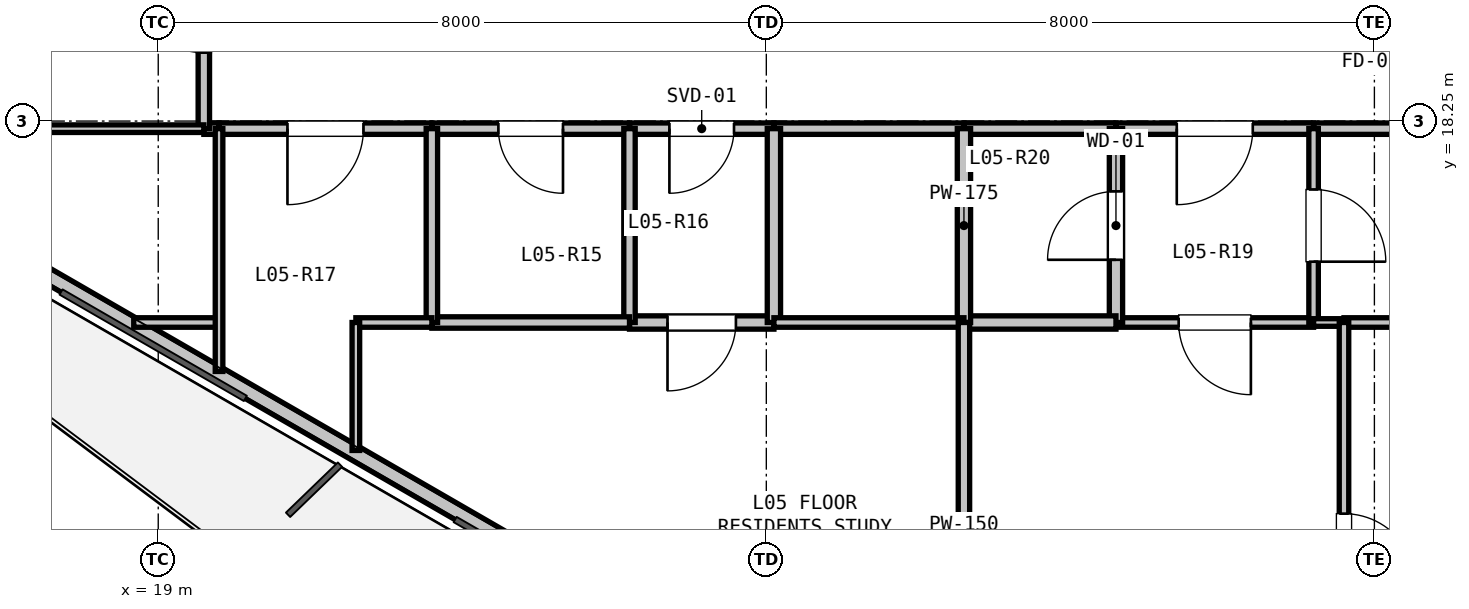
"""IFC4 building model, lengths in metres.
Left out: names, types, materials, properties, quantities, classifications, styles, units other than length and angle.
Written with IfcOpenShell. Run it as: python <this file> out.ifc"""

import sys

from ifc_helpers import new_model, si_unit, direction, frame, frame_2d, origin, place, context, subcontext, project, spatial, rectangle, extrude, element, fill, save


model = new_model("IFC4")
c1 = context("Model", 3, precision=1e-05, world=origin(), true_north=direction((0.0, 1.0)))
c2 = subcontext(c1, "Body", "Model", "MODEL_VIEW")
j1 = project(units=[si_unit("LENGTHUNIT", "METRE"), si_unit("PLANEANGLEUNIT", "RADIAN")], contexts=[c1])
p1 = place(None, origin())
s1 = spatial("IfcSite", under=j1, at=p1, CompositionType="ELEMENT")
p2 = place(p1, origin())
s2 = spatial("IfcBuilding", under=s1, at=p2, CompositionType="ELEMENT")
p3 = place(p2, frame((0.0, 0.0, 22.5)))
s3 = spatial("IfcBuildingStorey", under=s2, at=p3, CompositionType="ELEMENT", Elevation=22.5)
p4 = place(p3, frame((26.76, 10.896, 0.0), z_axis=(0.0, 0.0, 1.0), x_axis=(-0.866027351828, 0.499996625875, 0.0)))
e1 = element("IfcWall", 1, at=p4, inside=s3, PredefinedType="PARAPET", context=c2, shape_type="SweptSolid", body=[
    extrude(rectangle(XDim=11.973, YDim=0.2, at=frame_2d((5.987, 0.0))), origin(), (0.0, 0.0, 1.0), 0.2),
])
p5 = place(p3, frame((35.8, 18.15, 0.0), z_axis=(0.0, 0.0, 1.0), x_axis=(-1.0, 0.0, 0.0)))
e2 = element("IfcWall", 2, at=p5, inside=s3, PredefinedType="PARTITIONING", context=c2, shape_type="SweptSolid", body=[
    extrude(rectangle(XDim=1.6, YDim=0.15, at=frame_2d((0.8, 0.0))), origin(), (0.0, 0.0, 1.0), 3.04),
])
p6 = place(p3, frame((34.2, 18.15, 0.0), z_axis=(0.0, 0.0, 1.0), x_axis=(-1.0, 0.0, 0.0)))
e3 = element("IfcWall", 3, at=p6, inside=s3, PredefinedType="PARTITIONING", context=c2, shape_type="SweptSolid", body=[
    extrude(rectangle(XDim=2.6, YDim=0.15, at=frame_2d((1.3, 0.0))), origin(), (0.0, 0.0, 1.0), 3.04),
])
p7 = place(p6, frame((0.8, 0.0, 0.0)))
e4 = element("IfcOpeningElement", 4, at=p7, cuts=e3, PredefinedType="OPENING", context=c2, shape_type="SweptSolid", body=[
    extrude(rectangle(XDim=1.0, YDim=2.15, at=frame_2d((0.5, 1.075))), frame((0.0, 0.085, 0.0), z_axis=(0.0, -1.0, 0.0), x_axis=(1.0, 0.0, 0.0)), (0.0, 0.0, 1.0), 0.17),
])
p8 = place(p3, frame((31.6, 18.15, 0.0), z_axis=(0.0, 0.0, 1.0), x_axis=(-1.0, 0.0, 0.0)))
e5 = element("IfcWall", 5, at=p8, inside=s3, PredefinedType="PARTITIONING", context=c2, shape_type="SweptSolid", body=[
    extrude(rectangle(XDim=2.0, YDim=0.15, at=frame_2d((1.0, 0.0))), origin(), (0.0, 0.0, 1.0), 3.04),
])
p9 = place(p3, frame((29.6, 18.15, 0.0), z_axis=(0.0, 0.0, 1.0), x_axis=(-1.0, 0.0, 0.0)))
e6 = element("IfcWall", 6, at=p9, inside=s3, PredefinedType="PARTITIONING", context=c2, shape_type="SweptSolid", body=[
    extrude(rectangle(XDim=2.5, YDim=0.15, at=frame_2d((1.25, 0.0))), origin(), (0.0, 0.0, 1.0), 3.04),
])
p10 = place(p3, frame((27.1, 18.15, 0.0), z_axis=(0.0, 0.0, 1.0), x_axis=(-1.0, 0.0, 0.0)))
e7 = element("IfcWall", 7, at=p10, inside=s3, PredefinedType="PARTITIONING", context=c2, shape_type="SweptSolid", body=[
    extrude(rectangle(XDim=1.9, YDim=0.15, at=frame_2d((0.95, 0.0))), origin(), (0.0, 0.0, 1.0), 3.04),
])
p11 = place(p10, frame((0.525, 0.0, 0.0)))
e8 = element("IfcOpeningElement", 8, at=p11, cuts=e7, PredefinedType="OPENING", context=c2, shape_type="SweptSolid", body=[
    extrude(rectangle(XDim=0.85, YDim=2.1, at=frame_2d((0.425, 1.05))), frame((0.0, 0.085, 0.0), z_axis=(0.0, -1.0, 0.0), x_axis=(1.0, 0.0, 0.0)), (0.0, 0.0, 1.0), 0.17),
])
p12 = place(p3, frame((25.2, 18.15, 0.0), z_axis=(0.0, 0.0, 1.0), x_axis=(-1.0, 0.0, 0.0)))
e9 = element("IfcWall", 9, at=p12, inside=s3, PredefinedType="PARTITIONING", context=c2, shape_type="SweptSolid", body=[
    extrude(rectangle(XDim=2.6, YDim=0.15, at=frame_2d((1.3, 0.0))), origin(), (0.0, 0.0, 1.0), 2.337),
])
p13 = place(p12, frame((0.875, 0.0, 0.0)))
e10 = element("IfcOpeningElement", 10, at=p13, cuts=e9, PredefinedType="OPENING", context=c2, shape_type="SweptSolid", body=[
    extrude(rectangle(XDim=0.85, YDim=2.1, at=frame_2d((0.425, 1.05))), frame((0.0, 0.085, 0.0), z_axis=(0.0, -1.0, 0.0), x_axis=(1.0, 0.0, 0.0)), (0.0, 0.0, 1.0), 0.17),
])
p14 = place(p3, frame((22.6, 18.15, 0.0), z_axis=(0.0, 0.0, 1.0), x_axis=(-1.0, 0.0, 0.0)))
e11 = element("IfcWall", 11, at=p14, inside=s3, PredefinedType="PARTITIONING", context=c2, shape_type="SweptSolid", body=[
    extrude(rectangle(XDim=2.8, YDim=0.15, at=frame_2d((1.4, 0.0))), origin(), (0.0, 0.0, 1.0), 3.04),
])
p15 = place(p14, frame((0.9, 0.0, 0.0)))
e12 = element("IfcOpeningElement", 12, at=p15, cuts=e11, PredefinedType="OPENING", context=c2, shape_type="SweptSolid", body=[
    extrude(rectangle(XDim=1.0, YDim=2.15, at=frame_2d((0.5, 1.075))), frame((0.0, 0.085, 0.0), z_axis=(0.0, -1.0, 0.0), x_axis=(1.0, 0.0, 0.0)), (0.0, 0.0, 1.0), 0.17),
])
p16 = place(p3, frame((19.8, 18.15, 0.0), z_axis=(0.0, 0.0, 1.0), x_axis=(-1.0, 0.0, 0.0)))
e13 = element("IfcWall", 13, at=p16, inside=s3, PredefinedType="PARTITIONING", context=c2, shape_type="SweptSolid", body=[
    extrude(rectangle(XDim=0.2, YDim=0.15, at=frame_2d((0.1, 0.0))), origin(), (0.0, 0.0, 1.0), 3.04),
])
p17 = place(p3, frame((19.6, 18.15, 0.0), z_axis=(0.0, 0.0, 1.0), x_axis=(0.0, 1.0, 0.0)))
e14 = element("IfcWall", 14, at=p17, inside=s3, PredefinedType="PARTITIONING", context=c2, shape_type="SweptSolid", body=[
    extrude(rectangle(XDim=3.0, YDim=0.15, at=frame_2d((1.5, 0.0))), origin(), (0.0, 0.0, 1.0), 2.337),
])
p18 = place(p17, frame((1.0, 0.0, 0.0)))
e15 = element("IfcOpeningElement", 15, at=p18, cuts=e14, PredefinedType="OPENING", context=c2, shape_type="SweptSolid", body=[
    extrude(rectangle(XDim=1.0, YDim=2.15, at=frame_2d((0.5, 1.075))), frame((0.0, 0.085, 0.0), z_axis=(0.0, -1.0, 0.0), x_axis=(1.0, 0.0, 0.0)), (0.0, 0.0, 1.0), 0.17),
])
p19 = place(p3, frame((34.2, 15.6, 0.0), z_axis=(0.0, 0.0, 1.0), x_axis=(-1.0, 0.0, 0.0)))
e16 = element("IfcWall", 16, at=p19, inside=s3, PredefinedType="PARTITIONING", context=c2, shape_type="SweptSolid", body=[
    extrude(rectangle(XDim=2.6, YDim=0.125, at=frame_2d((1.3, 0.0))), origin(), (0.0, 0.0, 1.0), 3.04),
])
p20 = place(p19, frame((0.825, 0.0, 0.0)))
e17 = element("IfcOpeningElement", 17, at=p20, cuts=e16, PredefinedType="OPENING", context=c2, shape_type="SweptSolid", body=[
    extrude(rectangle(XDim=0.95, YDim=2.1, at=frame_2d((0.475, 1.05))), frame((0.0, 0.073, 0.0), z_axis=(0.0, -1.0, 0.0), x_axis=(1.0, 0.0, 0.0)), (0.0, 0.0, 1.0), 0.145),
])
p21 = place(p3, frame((31.6, 15.6, 0.0), z_axis=(0.0, 0.0, 1.0), x_axis=(0.0, 1.0, 0.0)))
e18 = element("IfcWall", 18, at=p21, inside=s3, PredefinedType="PLUMBINGWALL", context=c2, shape_type="SweptSolid", body=[
    extrude(rectangle(XDim=2.55, YDim=0.175, at=frame_2d((1.275, 0.0))), origin(), (0.0, 0.0, 1.0), 3.04),
])
p22 = place(p21, frame((0.825, 0.0, 0.0)))
e19 = element("IfcOpeningElement", 19, at=p22, cuts=e18, PredefinedType="OPENING", context=c2, shape_type="SweptSolid", body=[
    extrude(rectangle(XDim=0.9, YDim=2.1, at=frame_2d((0.45, 1.05))), frame((0.0, 0.097, 0.0), z_axis=(0.0, -1.0, 0.0), x_axis=(1.0, 0.0, 0.0)), (0.0, 0.0, 1.0), 0.195),
])
p23 = place(p3, frame((34.2, 18.15, 0.0), z_axis=(0.0, 0.0, 1.0), x_axis=(0.0, -1.0, 0.0)))
e20 = element("IfcWall", 20, at=p23, inside=s3, PredefinedType="PARTITIONING", context=c2, shape_type="SweptSolid", body=[
    extrude(rectangle(XDim=2.55, YDim=0.125, at=frame_2d((1.275, 0.0))), origin(), (0.0, 0.0, 1.0), 3.04),
])
p24 = place(p23, frame((0.8, 0.0, 0.0)))
e21 = element("IfcOpeningElement", 21, at=p24, cuts=e20, PredefinedType="OPENING", context=c2, shape_type="SweptSolid", body=[
    extrude(rectangle(XDim=0.95, YDim=2.1, at=frame_2d((0.475, 1.05))), frame((0.0, 0.073, 0.0), z_axis=(0.0, -1.0, 0.0), x_axis=(1.0, 0.0, 0.0)), (0.0, 0.0, 1.0), 0.145),
])
p25 = place(p3, frame((27.1, 15.6, 0.0), z_axis=(0.0, 0.0, 1.0), x_axis=(-1.0, 0.0, 0.0)))
e22 = element("IfcWall", 22, at=p25, inside=s3, PredefinedType="PLUMBINGWALL", context=c2, shape_type="SweptSolid", body=[
    extrude(rectangle(XDim=1.9, YDim=0.175, at=frame_2d((0.95, 0.0))), origin(), (0.0, 0.0, 1.0), 2.337),
])
p26 = place(p25, frame((0.5, 0.0, 0.0)))
e23 = element("IfcOpeningElement", 23, at=p26, cuts=e22, PredefinedType="OPENING", context=c2, shape_type="SweptSolid", body=[
    extrude(rectangle(XDim=0.9, YDim=2.1, at=frame_2d((0.45, 1.05))), frame((0.0, 0.097, 0.0), z_axis=(0.0, -1.0, 0.0), x_axis=(1.0, 0.0, 0.0)), (0.0, 0.0, 1.0), 0.195),
])
p27 = place(p3, frame((25.2, 15.6, 0.0), z_axis=(0.0, 0.0, 1.0), x_axis=(0.0, 1.0, 0.0)))
e24 = element("IfcWall", 24, at=p27, inside=s3, PredefinedType="PARTITIONING", context=c2, shape_type="SweptSolid", body=[
    extrude(rectangle(XDim=2.55, YDim=0.15, at=frame_2d((1.275, 0.0))), origin(), (0.0, 0.0, 1.0), 2.337),
])
p28 = place(p3, frame((27.1, 18.15, 0.0), z_axis=(0.0, 0.0, 1.0), x_axis=(0.0, -1.0, 0.0)))
e25 = element("IfcWall", 25, at=p28, inside=s3, PredefinedType="PLUMBINGWALL", context=c2, shape_type="SweptSolid", body=[
    extrude(rectangle(XDim=2.55, YDim=0.175, at=frame_2d((1.275, 0.0))), origin(), (0.0, 0.0, 1.0), 3.04),
])
p29 = place(p3, frame((31.6, 15.6, 0.0), z_axis=(0.0, 0.0, 1.0), x_axis=(-1.0, 0.0, 0.0)))
e26 = element("IfcWall", 26, at=p29, inside=s3, PredefinedType="PLUMBINGWALL", context=c2, shape_type="SweptSolid", body=[
    extrude(rectangle(XDim=2.0, YDim=0.175, at=frame_2d((1.0, 0.0))), origin(), (0.0, 0.0, 1.0), 3.04),
])
p30 = place(p3, frame((29.6, 15.6, 0.0), z_axis=(0.0, 0.0, 1.0), x_axis=(0.0, 1.0, 0.0)))
e27 = element("IfcWall", 27, at=p30, inside=s3, PredefinedType="PLUMBINGWALL", context=c2, shape_type="SweptSolid", body=[
    extrude(rectangle(XDim=2.55, YDim=0.175, at=frame_2d((1.275, 0.0))), origin(), (0.0, 0.0, 1.0), 3.04),
])
p31 = place(p3, frame((43.688, 15.6, 0.0), z_axis=(0.0, 0.0, 1.0), x_axis=(-1.0, 0.0, 0.0)))
e28 = element("IfcWall", 28, at=p31, inside=s3, PredefinedType="PARTITIONING", context=c2, shape_type="SweptSolid", body=[
    extrude(rectangle(XDim=9.088, YDim=0.125, at=frame_2d((4.544, 0.0))), origin(), (0.0, 0.0, 1.0), 2.337),
])
p32 = place(p31, frame((4.069, 0.0, 0.0)))
e29 = element("IfcOpeningElement", 29, at=p32, cuts=e28, PredefinedType="OPENING", context=c2, shape_type="SweptSolid", body=[
    extrude(rectangle(XDim=0.95, YDim=2.1, at=frame_2d((0.475, 1.05))), frame((0.0, 0.073, 0.0), z_axis=(0.0, -1.0, 0.0), x_axis=(1.0, 0.0, 0.0)), (0.0, 0.0, 1.0), 0.145),
])
p33 = place(p3, frame((34.6, 15.6, 0.0), z_axis=(0.0, 0.0, 1.0), x_axis=(-1.0, 0.0, 0.0)))
e30 = element("IfcWall", 30, at=p33, inside=s3, PredefinedType="PARTITIONING", context=c2, shape_type="SweptSolid", body=[
    extrude(rectangle(XDim=0.4, YDim=0.1, at=frame_2d((0.2, 0.0))), origin(), (0.0, 0.0, 1.0), 3.04),
])
p34 = place(p3, frame((19.6, 18.15, 0.0), z_axis=(0.0, 0.0, 1.0), x_axis=(-1.0, 0.0, 0.0)))
e31 = element("IfcWall", 31, at=p34, inside=s3, PredefinedType="PARTITIONING", context=c2, shape_type="SweptSolid", body=[
    extrude(rectangle(XDim=2.45, YDim=0.1, at=frame_2d((1.225, 0.0))), origin(), (0.0, 0.0, 1.0), 3.04),
])
p35 = place(p3, frame((25.2, 15.6, 0.0), z_axis=(0.0, 0.0, 1.0), x_axis=(-1.0, 0.0, 0.0)))
e32 = element("IfcWall", 32, at=p35, inside=s3, PredefinedType="PARTITIONING", context=c2, shape_type="SweptSolid", body=[
    extrude(rectangle(XDim=2.6, YDim=0.15, at=frame_2d((1.3, 0.0))), origin(), (0.0, 0.0, 1.0), 3.04),
])
p36 = place(p3, frame((22.6, 15.6, 0.0), z_axis=(0.0, 0.0, 1.0), x_axis=(0.0, 1.0, 0.0)))
e33 = element("IfcWall", 33, at=p36, inside=s3, PredefinedType="PARTITIONING", context=c2, shape_type="SweptSolid", body=[
    extrude(rectangle(XDim=2.55, YDim=0.15, at=frame_2d((1.275, 0.0))), origin(), (0.0, 0.0, 1.0), 3.04),
])
p37 = place(p3, frame((22.6, 15.6, 0.0), z_axis=(0.0, 0.0, 1.0), x_axis=(-1.0, 0.0, 0.0)))
e34 = element("IfcWall", 34, at=p37, inside=s3, PredefinedType="PARTITIONING", context=c2, shape_type="SweptSolid", body=[
    extrude(rectangle(XDim=1.0, YDim=0.125, at=frame_2d((0.5, 0.0))), origin(), (0.0, 0.0, 1.0), 3.04),
])
p38 = place(p3, frame((21.6, 15.6, 0.0), z_axis=(0.0, 0.0, 1.0), x_axis=(0.0, -1.0, 0.0)))
e35 = element("IfcWall", 35, at=p38, inside=s3, PredefinedType="PARTITIONING", context=c2, shape_type="SweptSolid", body=[
    extrude(rectangle(XDim=1.684, YDim=0.1, at=frame_2d((0.842, 0.0))), origin(), (0.0, 0.0, 1.0), 2.365),
])
p39 = place(p3, frame((18.678, 15.6, 0.0), z_axis=(0.0, 0.0, 1.0), x_axis=(1.0, 0.0, 0.0)))
e36 = element("IfcWall", 36, at=p39, inside=s3, PredefinedType="PARTITIONING", context=c2, shape_type="SweptSolid", body=[
    extrude(rectangle(XDim=1.122, YDim=0.125, at=frame_2d((0.561, 0.0))), origin(), (0.0, 0.0, 1.0), 2.365),
])
p40 = place(p3, frame((19.8, 14.956, 0.0), z_axis=(0.0, 0.0, 1.0), x_axis=(0.0, 1.0, 0.0)))
e37 = element("IfcWall", 37, at=p40, inside=s3, PredefinedType="PARTITIONING", context=c2, shape_type="SweptSolid", body=[
    extrude(rectangle(XDim=3.194, YDim=0.1, at=frame_2d((1.597, 0.0))), origin(), (0.0, 0.0, 1.0), 2.365),
])
p41 = place(p3, frame((27.1, 15.6, 0.0), z_axis=(0.0, 0.0, 1.0), x_axis=(1.0, 0.0, 0.0)))
e38 = element("IfcWall", 38, at=p41, inside=s3, PredefinedType="PARTITIONING", context=c2, shape_type="SweptSolid", body=[
    extrude(rectangle(XDim=2.5, YDim=0.125, at=frame_2d((1.25, 0.0))), origin(), (0.0, 0.0, 1.0), 3.04),
])
p42 = place(p3, frame((29.6, 15.6, 0.0), z_axis=(0.0, 0.0, 1.0), x_axis=(0.0, -1.0, 0.0)))
e39 = element("IfcWall", 39, at=p42, inside=s3, PredefinedType="PARTITIONING", context=c2, shape_type="SweptSolid", body=[
    extrude(rectangle(XDim=6.157, YDim=0.15, at=frame_2d((3.079, 0.0))), origin(), (0.0, 0.0, 1.0), 2.337),
])
p43 = place(p3, frame((34.6, 15.6, 0.0), z_axis=(0.0, 0.0, 1.0), x_axis=(0.0, -1.0, 0.0)))
e40 = element("IfcWall", 40, at=p43, inside=s3, PredefinedType="PARTITIONING", context=c2, shape_type="SweptSolid", body=[
    extrude(rectangle(XDim=5.98, YDim=0.125, at=frame_2d((2.99, 0.0))), origin(), (0.0, 0.0, 1.0), 3.04),
])
p44 = place(p43, frame((2.515, 0.0, 0.0)))
e41 = element("IfcOpeningElement", 41, at=p44, cuts=e40, PredefinedType="OPENING", context=c2, shape_type="SweptSolid", body=[
    extrude(rectangle(XDim=0.95, YDim=2.1, at=frame_2d((0.475, 1.05))), frame((0.0, 0.073, 0.0), z_axis=(0.0, -1.0, 0.0), x_axis=(1.0, 0.0, 0.0)), (0.0, 0.0, 1.0), 0.145),
])
p45 = place(p7, origin())
e42 = element("IfcDoor", 42, at=p45, inside=s3, OperationType="SINGLE_SWING_RIGHT", PredefinedType="DOOR", context=c2, shape_type="SweptSolid", body=[
    extrude(rectangle(XDim=1.0, YDim=2.15, at=frame_2d((0.5, 1.075))), frame((0.0, 0.025, 0.0), z_axis=(0.0, -1.0, 0.0), x_axis=(1.0, 0.0, 0.0)), (0.0, 0.0, 1.0), 0.05),
])
fill(e4, e42)
p46 = place(p11, origin())
e43 = element("IfcDoor", 43, at=p46, inside=s3, OperationType="SINGLE_SWING_RIGHT", PredefinedType="DOOR", context=c2, shape_type="SweptSolid", body=[
    extrude(rectangle(XDim=0.85, YDim=2.1, at=frame_2d((0.425, 1.05))), frame((0.0, 0.025, 0.0), z_axis=(0.0, -1.0, 0.0), x_axis=(1.0, 0.0, 0.0)), (0.0, 0.0, 1.0), 0.05),
])
fill(e8, e43)
p47 = place(p13, origin())
e44 = element("IfcDoor", 44, at=p47, inside=s3, OperationType="SINGLE_SWING_LEFT", PredefinedType="DOOR", context=c2, shape_type="SweptSolid", body=[
    extrude(rectangle(XDim=0.85, YDim=2.1, at=frame_2d((0.425, 1.05))), frame((0.0, 0.025, 0.0), z_axis=(0.0, -1.0, 0.0), x_axis=(1.0, 0.0, 0.0)), (0.0, 0.0, 1.0), 0.05),
])
fill(e10, e44)
p48 = place(p15, origin())
e45 = element("IfcDoor", 45, at=p48, inside=s3, OperationType="SINGLE_SWING_RIGHT", PredefinedType="DOOR", context=c2, shape_type="SweptSolid", body=[
    extrude(rectangle(XDim=1.0, YDim=2.15, at=frame_2d((0.5, 1.075))), frame((0.0, 0.025, 0.0), z_axis=(0.0, -1.0, 0.0), x_axis=(1.0, 0.0, 0.0)), (0.0, 0.0, 1.0), 0.05),
])
fill(e12, e45)
p49 = place(p22, origin())
e46 = element("IfcDoor", 46, at=p49, inside=s3, OperationType="SINGLE_SWING_LEFT", PredefinedType="DOOR", context=c2, shape_type="SweptSolid", body=[
    extrude(rectangle(XDim=0.9, YDim=2.1, at=frame_2d((0.45, 1.05))), frame((0.0, 0.025, 0.0), z_axis=(0.0, -1.0, 0.0), x_axis=(1.0, 0.0, 0.0)), (0.0, 0.0, 1.0), 0.05),
])
fill(e19, e46)
p50 = place(p24, origin())
e47 = element("IfcDoor", 47, at=p50, inside=s3, OperationType="SINGLE_SWING_RIGHT", PredefinedType="DOOR", context=c2, shape_type="SweptSolid", body=[
    extrude(rectangle(XDim=0.95, YDim=2.1, at=frame_2d((0.475, 1.05))), frame((0.0, 0.025, 0.0), z_axis=(0.0, -1.0, 0.0), x_axis=(1.0, 0.0, 0.0)), (0.0, 0.0, 1.0), 0.05),
])
fill(e21, e47)
p51 = place(p20, origin())
e48 = element("IfcDoor", 48, at=p51, inside=s3, OperationType="SINGLE_SWING_LEFT", PredefinedType="DOOR", context=c2, shape_type="SweptSolid", body=[
    extrude(rectangle(XDim=0.95, YDim=2.1, at=frame_2d((0.475, 1.05))), frame((0.0, 0.025, 0.0), z_axis=(0.0, -1.0, 0.0), x_axis=(1.0, 0.0, 0.0)), (0.0, 0.0, 1.0), 0.05),
])
fill(e17, e48)
p52 = place(p44, origin())
e49 = element("IfcDoor", 49, at=p52, inside=s3, OperationType="SINGLE_SWING_RIGHT", PredefinedType="DOOR", context=c2, shape_type="SweptSolid", body=[
    extrude(rectangle(XDim=0.95, YDim=2.1, at=frame_2d((0.475, 1.05))), frame((0.0, 0.025, 0.0), z_axis=(0.0, -1.0, 0.0), x_axis=(1.0, 0.0, 0.0)), (0.0, 0.0, 1.0), 0.05),
])
fill(e41, e49)
p53 = place(p26, origin())
e50 = element("IfcDoor", 50, at=p53, inside=s3, OperationType="SINGLE_SWING_RIGHT", PredefinedType="DOOR", context=c2, shape_type="SweptSolid", body=[
    extrude(rectangle(XDim=0.9, YDim=2.1, at=frame_2d((0.45, 1.05))), frame((0.0, 0.025, 0.0), z_axis=(0.0, -1.0, 0.0), x_axis=(1.0, 0.0, 0.0)), (0.0, 0.0, 1.0), 0.05),
])
fill(e23, e50)
save(model, sys.argv[1])
